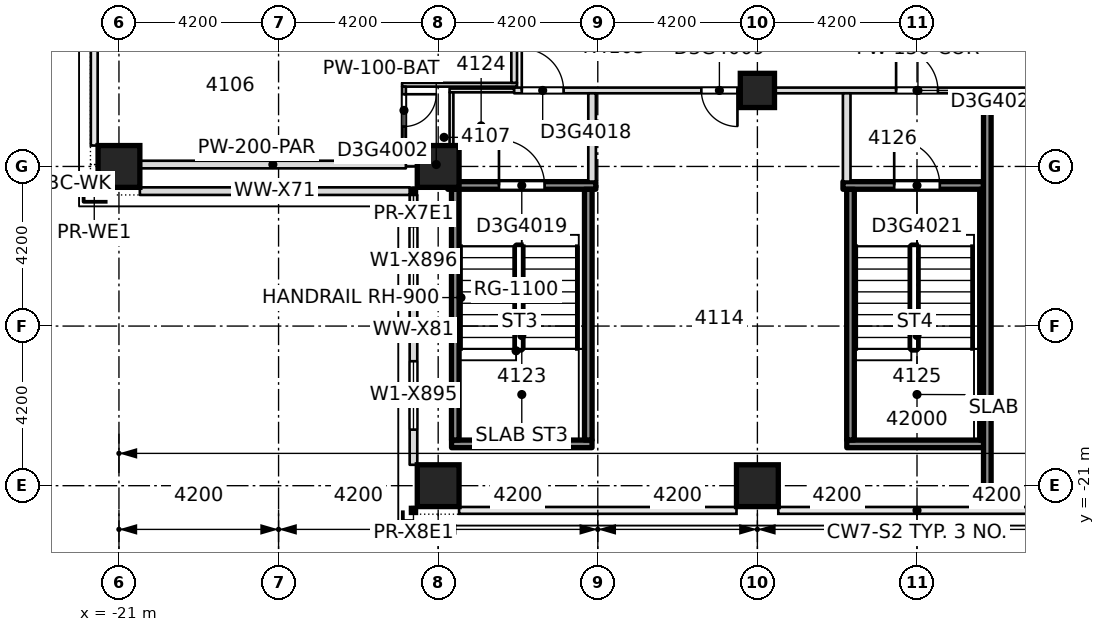
"""IFC4 building model, lengths in metres.
Left out: names, types, materials, properties, quantities, classifications, styles, units other than length and angle.
Written with IfcOpenShell. Run it as: python <this file> out.ifc"""

import sys

from ifc_helpers import new_model, si_unit, direction, frame, frame_2d, origin, origin_2d, place, context, subcontext, project, spatial, rectangle, extrude, element, fill, save


model = new_model("IFC4")
c1 = context("Model", 3, precision=1e-05, world=origin(), true_north=direction((0.0, 1.0)))
c2 = subcontext(c1, "Body", "Model", "MODEL_VIEW")
j1 = project(units=[si_unit("LENGTHUNIT", "METRE"), si_unit("PLANEANGLEUNIT", "RADIAN")], contexts=[c1])
p1 = place(None, origin())
s1 = spatial("IfcSite", under=j1, at=p1, CompositionType="ELEMENT")
p2 = place(p1, origin())
s2 = spatial("IfcBuilding", under=s1, at=p2, CompositionType="ELEMENT")
p3 = place(p2, frame((0.0, 0.0, 160.7)))
s3 = spatial("IfcBuildingStorey", under=s2, at=p3, CompositionType="ELEMENT", Elevation=160.7)
for number, where, z_axis, x_axis in (
    (1, (-12.6, -21.0, -0.4), (0.0, 0.0, 1.0), (1.0, 0.0, 0.0)),
    (2, (-4.2, -21.0, -0.4), (0.0, 0.0, 1.0), (1.0, 0.0, 0.0)),
    (3, (-21.0, -12.6, -0.4), (0.0, 0.0, 1.0), (1.0, 0.0, 0.0)),
    (4, (-12.6, -12.6, -0.4), (0.0, 0.0, 1.0), (1.0, 0.0, 0.0)),
):
    element("IfcColumn", number, at=place(p3, frame(where, z_axis=z_axis, x_axis=x_axis)), inside=s3, PredefinedType="COLUMN", context=c2, shape_type="SweptSolid", body=[
        extrude(rectangle(XDim=1.1, YDim=1.1, at=origin_2d()), origin(), (0.0, 0.0, 1.0), 3.45),
    ])
p4 = place(p3, frame((-4.2, -10.6, -0.4), z_axis=(0.0, 0.0, 1.0), x_axis=(1.0, 0.0, 0.0)))
e5 = element("IfcColumn", 5, at=p4, inside=s3, PredefinedType="COLUMN", context=c2, shape_type="SweptSolid", body=[
    extrude(rectangle(XDim=0.9, YDim=0.9, at=origin_2d()), origin(), (0.0, 0.0, 1.0), 3.45),
])
p5 = place(p3, frame((-12.248, -19.9, 0.0), z_axis=(0.0, 0.0, 1.0), x_axis=(1.0, 0.0, 0.0)))
e6 = element("IfcWall", 6, at=p5, inside=s3, PredefinedType="SOLIDWALL", context=c2, shape_type="SweptSolid", body=[
    extrude(rectangle(XDim=3.696, YDim=0.2, at=frame_2d((1.848, 0.0))), origin(), (0.0, 0.0, 1.0), 3.05),
])
p6 = place(p3, frame((-1.848, -19.9, 0.0), z_axis=(0.0, 0.0, 1.0), x_axis=(1.0, 0.0, 0.0)))
e7 = element("IfcWall", 7, at=p6, inside=s3, PredefinedType="SOLIDWALL", context=c2, shape_type="SweptSolid", body=[
    extrude(rectangle(XDim=3.696, YDim=0.2, at=frame_2d((1.848, 0.0))), origin(), (0.0, 0.0, 1.0), 3.05),
])
p7 = place(p3, frame((-12.348, -13.1, 0.0), z_axis=(0.0, 0.0, 1.0), x_axis=(1.0, 0.0, 0.0)))
e8 = element("IfcWall", 8, at=p7, inside=s3, PredefinedType="SOLIDWALL", context=c2, shape_type="SweptSolid", body=[
    extrude(rectangle(XDim=3.896, YDim=0.2, at=frame_2d((1.948, 0.0))), origin(), (0.0, 0.0, 1.0), 3.05),
])
p8 = place(p7, frame((1.348, 0.0, 0.0)))
e9 = element("IfcOpeningElement", 9, at=p8, cuts=e8, PredefinedType="OPENING", context=c2, shape_type="SweptSolid", body=[
    extrude(rectangle(XDim=1.2, YDim=2.1, at=frame_2d((0.6, 1.05))), frame((0.0, 0.11, 0.0), z_axis=(0.0, -1.0, 0.0), x_axis=(1.0, 0.0, 0.0)), (0.0, 0.0, 1.0), 0.22),
])
p9 = place(p3, frame((-1.948, -13.1, 0.0), z_axis=(0.0, 0.0, 1.0), x_axis=(1.0, 0.0, 0.0)))
e10 = element("IfcWall", 10, at=p9, inside=s3, PredefinedType="SOLIDWALL", context=c2, shape_type="SweptSolid", body=[
    extrude(rectangle(XDim=3.696, YDim=0.2, at=frame_2d((1.848, 0.0))), origin(), (0.0, 0.0, 1.0), 3.05),
])
p10 = place(p9, frame((1.348, 0.0, 0.0)))
e11 = element("IfcOpeningElement", 11, at=p10, cuts=e10, PredefinedType="OPENING", context=c2, shape_type="SweptSolid", body=[
    extrude(rectangle(XDim=1.2, YDim=2.1, at=frame_2d((0.6, 1.05))), frame((0.0, 0.11, 0.0), z_axis=(0.0, -1.0, 0.0), x_axis=(1.0, 0.0, 0.0)), (0.0, 0.0, 1.0), 0.22),
])
p11 = place(p3, frame((-21.55, -12.55, 0.0), z_axis=(0.0, 0.0, 1.0), x_axis=(1.0, 0.0, 0.0)))
e12 = element("IfcWall", 12, at=p11, inside=s3, PredefinedType="PARTITIONING", context=c2, shape_type="SweptSolid", body=[
    extrude(rectangle(XDim=1.1, YDim=0.2, at=frame_2d((0.55, 0.0))), origin(), (0.0, 0.0, 1.0), 3.05),
])
p12 = place(p3, frame((-13.55, -12.55, 0.0), z_axis=(0.0, 0.0, 1.0), x_axis=(1.0, 0.0, 0.0)))
e13 = element("IfcWall", 13, at=p12, inside=s3, PredefinedType="PARTITIONING", context=c2, shape_type="SweptSolid", body=[
    extrude(rectangle(XDim=0.4, YDim=0.1, at=frame_2d((0.2, 0.0))), origin(), (0.0, 0.0, 1.0), 2.5),
])
p13 = place(p3, frame((-12.3, -10.6, 0.0), z_axis=(0.0, 0.0, 1.0), x_axis=(1.0, 0.0, 0.0)))
e14 = element("IfcWall", 14, at=p13, inside=s3, PredefinedType="PARTITIONING", context=c2, shape_type="SweptSolid", body=[
    extrude(rectangle(XDim=1.7, YDim=0.1, at=frame_2d((0.85, 0.0))), origin(), (0.0, 0.0, 1.0), 3.05),
])
p14 = place(p3, frame((-10.6, -10.6, 0.0), z_axis=(0.0, 0.0, 1.0), x_axis=(1.0, 0.0, 0.0)))
e15 = element("IfcWall", 15, at=p14, inside=s3, PredefinedType="PARTITIONING", context=c2, shape_type="SweptSolid", body=[
    extrude(rectangle(XDim=21.25, YDim=0.15, at=frame_2d((10.625, 0.0))), origin(), (0.0, 0.0, 1.0), 3.05),
])
p15 = place(p14, frame((4.925, 0.0, 0.0)))
e16 = element("IfcOpeningElement", 16, at=p15, cuts=e15, PredefinedType="OPENING", context=c2, shape_type="SweptSolid", body=[
    extrude(rectangle(XDim=0.95, YDim=2.1, at=frame_2d((0.475, 1.05))), frame((0.0, 0.085, 0.0), z_axis=(0.0, -1.0, 0.0), x_axis=(1.0, 0.0, 0.0)), (0.0, 0.0, 1.0), 0.17),
])
p16 = place(p14, frame((15.325, 0.0, 0.0)))
e17 = element("IfcOpeningElement", 17, at=p16, cuts=e15, PredefinedType="OPENING", context=c2, shape_type="SweptSolid", body=[
    extrude(rectangle(XDim=0.95, YDim=2.1, at=frame_2d((0.475, 1.05))), frame((0.0, 0.085, 0.0), z_axis=(0.0, -1.0, 0.0), x_axis=(1.0, 0.0, 0.0)), (0.0, 0.0, 1.0), 0.17),
])
p17 = place(p14, frame((0.2, 0.0, 0.0)))
e18 = element("IfcOpeningElement", 18, at=p17, cuts=e15, PredefinedType="OPENING", context=c2, shape_type="SweptSolid", body=[
    extrude(rectangle(XDim=1.1, YDim=2.1, at=frame_2d((0.55, 1.05))), frame((0.0, 0.085, 0.0), z_axis=(0.0, -1.0, 0.0), x_axis=(1.0, 0.0, 0.0)), (0.0, 0.0, 1.0), 0.17),
])
p18 = place(p14, frame((10.05, 0.0, 0.0)))
e19 = element("IfcOpeningElement", 19, at=p18, cuts=e15, PredefinedType="OPENING", context=c2, shape_type="SweptSolid", body=[
    extrude(rectangle(XDim=1.1, YDim=2.1, at=frame_2d((0.55, 1.05))), frame((0.0, 0.085, 0.0), z_axis=(0.0, -1.0, 0.0), x_axis=(1.0, 0.0, 0.0)), (0.0, 0.0, 1.0), 0.17),
])
p19 = place(p14, frame((19.9, 0.0, 0.0)))
e20 = element("IfcOpeningElement", 20, at=p19, cuts=e15, PredefinedType="OPENING", context=c2, shape_type="SweptSolid", body=[
    extrude(rectangle(XDim=1.1, YDim=2.1, at=frame_2d((0.55, 1.05))), frame((0.0, 0.085, 0.0), z_axis=(0.0, -1.0, 0.0), x_axis=(1.0, 0.0, 0.0)), (0.0, 0.0, 1.0), 0.17),
])
p20 = place(p3, frame((-13.55, -10.45, 0.0), z_axis=(0.0, 0.0, 1.0), x_axis=(1.0, 0.0, 0.0)))
e21 = element("IfcWall", 21, at=p20, inside=s3, PredefinedType="PARTITIONING", context=c2, shape_type="SweptSolid", body=[
    extrude(rectangle(XDim=3.025, YDim=0.1, at=frame_2d((1.513, 0.0))), origin(), (0.0, 0.0, 1.0), 3.05),
])
p21 = place(p3, frame((-13.5, -12.45, 0.0), z_axis=(0.0, 0.0, 1.0), x_axis=(0.0, 1.0, 0.0)))
e22 = element("IfcWall", 22, at=p21, inside=s3, PredefinedType="PARTITIONING", context=c2, shape_type="SweptSolid", body=[
    extrude(rectangle(XDim=1.95, YDim=0.1, at=frame_2d((0.975, 0.0))), origin(), (0.0, 0.0, 1.0), 3.05),
])
p22 = place(p21, frame((0.9, 0.0, 0.0)))
e23 = element("IfcOpeningElement", 23, at=p22, cuts=e22, PredefinedType="OPENING", context=c2, shape_type="SweptSolid", body=[
    extrude(rectangle(XDim=0.85, YDim=2.1, at=frame_2d((0.425, 1.05))), frame((0.0, 0.06, 0.0), z_axis=(0.0, -1.0, 0.0), x_axis=(1.0, 0.0, 0.0)), (0.0, 0.0, 1.0), 0.12),
])
p23 = place(p3, frame((-12.25, -12.998, 0.0), z_axis=(0.0, 0.0, 1.0), x_axis=(0.0, 1.0, 0.0)))
e24 = element("IfcWall", 24, at=p23, inside=s3, PredefinedType="PARTITIONING", context=c2, shape_type="SweptSolid", body=[
    extrude(rectangle(XDim=0.396, YDim=0.2, at=frame_2d((0.198, 0.0))), origin(), (0.0, 0.0, 1.0), 3.05),
])
p24 = place(p3, frame((-12.25, -12.5, 0.0), z_axis=(0.0, 0.0, 1.0), x_axis=(0.0, 1.0, 0.0)))
e25 = element("IfcWall", 25, at=p24, inside=s3, PredefinedType="PARTITIONING", context=c2, shape_type="SweptSolid", body=[
    extrude(rectangle(XDim=1.85, YDim=0.1, at=frame_2d((0.925, 0.0))), origin(), (0.0, 0.0, 1.0), 3.05),
])
p25 = place(p3, frame((-12.15, -19.798, 0.0), z_axis=(0.0, 0.0, 1.0), x_axis=(0.0, 1.0, 0.0)))
e26 = element("IfcWall", 26, at=p25, inside=s3, PredefinedType="SOLIDWALL", context=c2, shape_type="SweptSolid", body=[
    extrude(rectangle(XDim=6.596, YDim=0.2, at=frame_2d((3.298, 0.0))), origin(), (0.0, 0.0, 1.0), 3.05),
])
p26 = place(p3, frame((-10.6, -10.4, 0.0), z_axis=(0.0, 0.0, 1.0), x_axis=(0.0, 1.0, 0.0)))
e27 = element("IfcWall", 27, at=p26, inside=s3, PredefinedType="PARTITIONING", context=c2, shape_type="SweptSolid", body=[
    extrude(rectangle(XDim=1.925, YDim=0.15, at=frame_2d((0.962, 0.0))), origin(), (0.0, 0.0, 1.0), 3.05),
])
p27 = place(p3, frame((-8.65, -19.798, 0.0), z_axis=(0.0, 0.0, 1.0), x_axis=(0.0, 1.0, 0.0)))
e28 = element("IfcWall", 28, at=p27, inside=s3, PredefinedType="SOLIDWALL", context=c2, shape_type="SweptSolid", body=[
    extrude(rectangle(XDim=6.596, YDim=0.2, at=frame_2d((3.298, 0.0))), origin(), (0.0, 0.0, 1.0), 3.05),
])
for number, where, z_axis, x_axis in (
    (29, (-8.55, -12.998, 0.0), (0.0, 0.0, 1.0), (0.0, 1.0, 0.0)),
    (30, (-1.85, -12.998, 0.0), (0.0, 0.0, 1.0), (0.0, 1.0, 0.0)),
):
    element("IfcWall", number, at=place(p3, frame(where, z_axis=z_axis, x_axis=x_axis)), inside=s3, PredefinedType="PARTITIONING", context=c2, shape_type="SweptSolid", body=[
        extrude(rectangle(XDim=2.323, YDim=0.2, at=frame_2d((1.162, 0.0))), origin(), (0.0, 0.0, 1.0), 3.05),
    ])
for number, where, z_axis, x_axis in (
    (31, (-1.75, -19.798, 0.0), (0.0, 0.0, 1.0), (0.0, 1.0, 0.0)),
    (32, (1.75, -19.798, 0.0), (0.0, 0.0, 1.0), (0.0, 1.0, 0.0)),
):
    element("IfcWall", number, at=place(p3, frame(where, z_axis=z_axis, x_axis=x_axis)), inside=s3, PredefinedType="SOLIDWALL", context=c2, shape_type="SweptSolid", body=[
        extrude(rectangle(XDim=6.596, YDim=0.2, at=frame_2d((3.298, 0.0))), origin(), (0.0, 0.0, 1.0), 3.05),
    ])
p28 = place(p3, frame((-20.45, -13.25, 0.0), z_axis=(0.0, 0.0, 1.0), x_axis=(1.0, 0.0, 0.0)))
e33 = element("IfcWall", 33, at=p28, inside=s3, PredefinedType="STANDARD", context=c2, shape_type="SweptSolid", body=[
    extrude(rectangle(XDim=7.1, YDim=0.2, at=frame_2d((3.55, 0.0))), origin(), (0.0, 0.0, 1.0), 3.05),
])
p29 = place(p3, frame((-13.25, -13.35, 0.0), z_axis=(0.0, 0.0, 1.0), x_axis=(0.0, -1.0, 0.0)))
e34 = element("IfcWall", 34, at=p29, inside=s3, PredefinedType="STANDARD", context=c2, shape_type="SweptSolid", body=[
    extrude(rectangle(XDim=7.1, YDim=0.2, at=frame_2d((3.55, 0.0))), origin(), (0.0, 0.0, 1.0), 3.05),
])
p30 = place(p29, frame((4.375, 0.0, 0.2)))
e35 = element("IfcOpeningElement", 35, at=p30, cuts=e34, PredefinedType="OPENING", context=c2, shape_type="SweptSolid", body=[
    extrude(rectangle(XDim=1.8, YDim=2.65, at=frame_2d((0.9, 1.325))), frame((0.0, 0.11, 0.0), z_axis=(0.0, -1.0, 0.0), x_axis=(1.0, 0.0, 0.0)), (0.0, 0.0, 1.0), 0.22),
])
p31 = place(p29, frame((0.825, 0.0, 0.2)))
e36 = element("IfcOpeningElement", 36, at=p31, cuts=e34, PredefinedType="OPENING", context=c2, shape_type="SweptSolid", body=[
    extrude(rectangle(XDim=1.8, YDim=2.65, at=frame_2d((0.9, 1.325))), frame((0.0, 0.11, 0.0), z_axis=(0.0, -1.0, 0.0), x_axis=(1.0, 0.0, 0.0)), (0.0, 0.0, 1.0), 0.22),
])
p32 = place(p3, frame((1.85, -21.55, 0.0), z_axis=(0.0, 0.0, 1.0), x_axis=(0.0, 1.0, 0.0)))
e37 = element("IfcWall", 37, at=p32, inside=s3, PredefinedType="SOLIDWALL", context=c2, shape_type="SweptSolid", body=[
    extrude(rectangle(XDim=10.875, YDim=0.2, at=frame_2d((5.438, 0.0))), origin(), (0.0, 0.0, 1.0), 3.05),
])
p33 = place(p3, frame((-20.45, -12.55, 0.0), z_axis=(0.0, 0.0, 1.0), x_axis=(1.0, 0.0, 0.0)))
e38 = element("IfcWall", 38, at=p33, inside=s3, PredefinedType="PARTITIONING", context=c2, shape_type="SweptSolid", body=[
    extrude(rectangle(XDim=7.0, YDim=0.2, at=frame_2d((3.5, 0.0))), origin(), (0.0, 0.0, 1.0), 2.5),
])
p34 = place(p3, frame((-13.15, -12.55, 0.0), z_axis=(0.0, 0.0, 1.0), x_axis=(1.0, 0.0, 0.0)))
e39 = element("IfcWall", 39, at=p34, inside=s3, PredefinedType="PARTITIONING", context=c2, shape_type="SweptSolid", body=[
    extrude(rectangle(XDim=0.998, YDim=0.1, at=frame_2d((0.499, 0.0))), origin(), (0.0, 0.0, 1.0), 3.05),
])
p35 = place(p22, origin())
e40 = element("IfcDoor", 40, at=p35, inside=s3, OperationType="SINGLE_SWING_RIGHT", PredefinedType="DOOR", context=c2, shape_type="SweptSolid", body=[
    extrude(rectangle(XDim=0.85, YDim=2.1, at=frame_2d((0.425, 1.05))), frame((0.0, 0.025, 0.0), z_axis=(0.0, -1.0, 0.0), x_axis=(1.0, 0.0, 0.0)), (0.0, 0.0, 1.0), 0.05),
])
fill(e23, e40)
p36 = place(p15, origin())
e41 = element("IfcDoor", 41, at=p36, inside=s3, OperationType="SINGLE_SWING_LEFT", PredefinedType="DOOR", context=c2, shape_type="SweptSolid", body=[
    extrude(rectangle(XDim=0.95, YDim=2.1, at=frame_2d((0.475, 1.05))), frame((0.0, 0.025, 0.0), z_axis=(0.0, -1.0, 0.0), x_axis=(1.0, 0.0, 0.0)), (0.0, 0.0, 1.0), 0.05),
])
fill(e16, e41)
p37 = place(p17, origin())
e42 = element("IfcDoor", 42, at=p37, inside=s3, OperationType="SINGLE_SWING_RIGHT", PredefinedType="DOOR", context=c2, shape_type="SweptSolid", body=[
    extrude(rectangle(XDim=1.1, YDim=2.1, at=frame_2d((0.55, 1.05))), frame((0.0, 0.025, 0.0), z_axis=(0.0, -1.0, 0.0), x_axis=(1.0, 0.0, 0.0)), (0.0, 0.0, 1.0), 0.05),
])
fill(e18, e42)
p38 = place(p8, origin())
e43 = element("IfcDoor", 43, at=p38, inside=s3, OperationType="SINGLE_SWING_RIGHT", PredefinedType="DOOR", context=c2, shape_type="SweptSolid", body=[
    extrude(rectangle(XDim=1.2, YDim=2.1, at=frame_2d((0.6, 1.05))), frame((0.0, 0.025, 0.0), z_axis=(0.0, -1.0, 0.0), x_axis=(1.0, 0.0, 0.0)), (0.0, 0.0, 1.0), 0.05),
])
fill(e9, e43)
p39 = place(p18, origin())
e44 = element("IfcDoor", 44, at=p39, inside=s3, OperationType="SINGLE_SWING_LEFT", PredefinedType="DOOR", context=c2, shape_type="SweptSolid", body=[
    extrude(rectangle(XDim=1.1, YDim=2.1, at=frame_2d((0.55, 1.05))), frame((0.0, 0.025, 0.0), z_axis=(0.0, -1.0, 0.0), x_axis=(1.0, 0.0, 0.0)), (0.0, 0.0, 1.0), 0.05),
])
fill(e19, e44)
p40 = place(p10, origin())
e45 = element("IfcDoor", 45, at=p40, inside=s3, OperationType="SINGLE_SWING_RIGHT", PredefinedType="DOOR", context=c2, shape_type="SweptSolid", body=[
    extrude(rectangle(XDim=1.2, YDim=2.1, at=frame_2d((0.6, 1.05))), frame((0.0, 0.025, 0.0), z_axis=(0.0, -1.0, 0.0), x_axis=(1.0, 0.0, 0.0)), (0.0, 0.0, 1.0), 0.05),
])
fill(e11, e45)
p41 = place(p30, origin())
e46 = element("IfcWindow", 46, at=p41, inside=s3, PartitioningType="SINGLE_PANEL", PredefinedType="WINDOW", context=c2, shape_type="SweptSolid", body=[
    extrude(rectangle(XDim=1.8, YDim=2.65, at=frame_2d((0.9, 1.325))), frame((0.0, 0.03, 0.0), z_axis=(0.0, -1.0, 0.0), x_axis=(1.0, 0.0, 0.0)), (0.0, 0.0, 1.0), 0.06),
])
fill(e35, e46)
p42 = place(p31, origin())
e47 = element("IfcWindow", 47, at=p42, inside=s3, PartitioningType="SINGLE_PANEL", PredefinedType="WINDOW", context=c2, shape_type="SweptSolid", body=[
    extrude(rectangle(XDim=1.8, YDim=2.65, at=frame_2d((0.9, 1.325))), frame((0.0, 0.03, 0.0), z_axis=(0.0, -1.0, 0.0), x_axis=(1.0, 0.0, 0.0)), (0.0, 0.0, 1.0), 0.06),
])
fill(e36, e47)
save(model, sys.argv[1])
